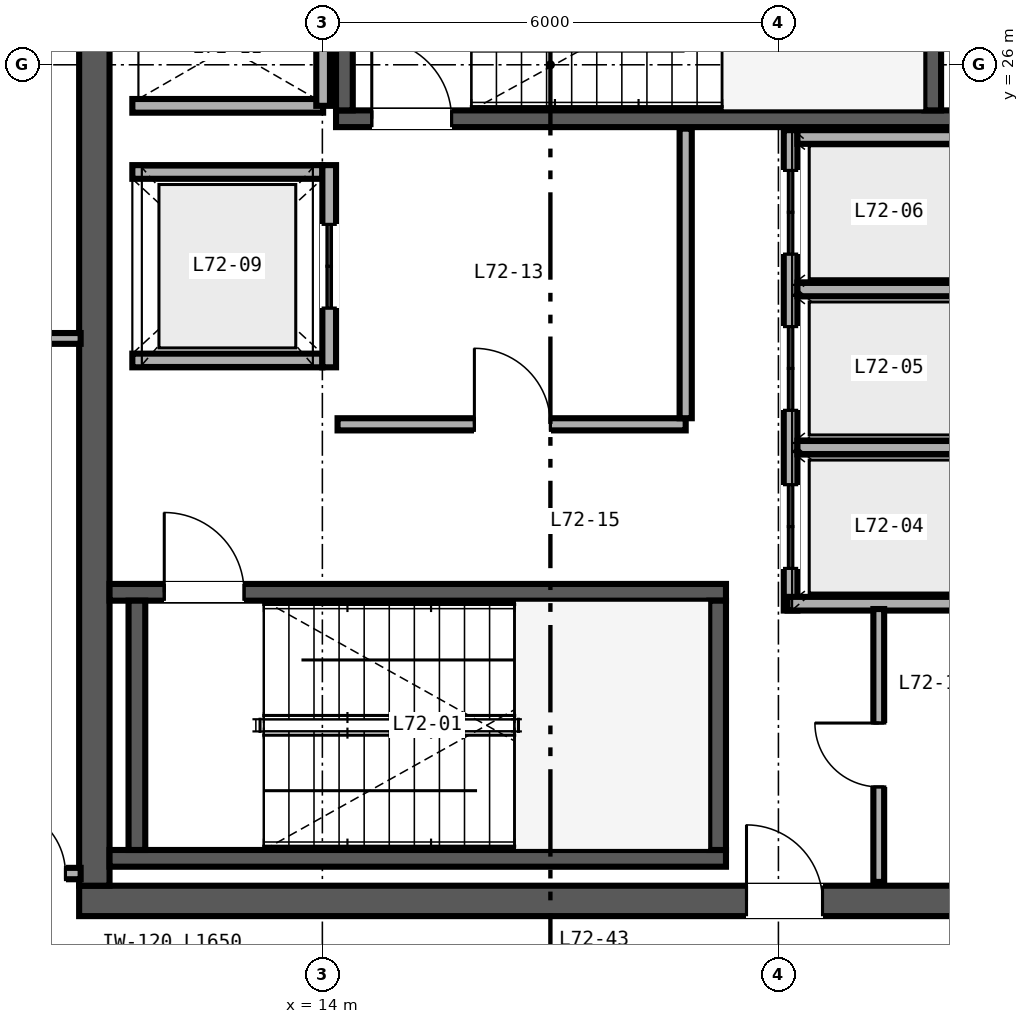
"""IFC4 building model, lengths in metres.
Left out: names, types, materials, properties, quantities, classifications, styles, units other than length and angle.
Written with IfcOpenShell. Run it as: python <this file> out.ifc"""

import sys

from ifc_helpers import new_model, si_unit, direction, frame, frame_2d, origin, place, context, subcontext, project, spatial, rectangle, extrude, source, transform, mapped, element, fill, save


model = new_model("IFC4")
c1 = context("Model", 3, precision=1e-05, world=origin(), true_north=direction((0.0, 1.0)))
c2 = subcontext(c1, "Body", "Model", "MODEL_VIEW")
j1 = project(units=[si_unit("LENGTHUNIT", "METRE"), si_unit("PLANEANGLEUNIT", "RADIAN")], contexts=[c1])
p1 = place(None, origin())
s1 = spatial("IfcSite", under=j1, at=p1, CompositionType="ELEMENT")
p2 = place(p1, origin())
s2 = spatial("IfcBuilding", under=s1, at=p2, CompositionType="ELEMENT")
p3 = place(p2, frame((0.0, 0.0, 283.2)))
s3 = spatial("IfcBuildingStorey", under=s2, at=p3, CompositionType="ELEMENT", Elevation=283.2)
p4 = place(p3, frame((10.8, 15.0, 0.0), z_axis=(0.0, 0.0, 1.0), x_axis=(1.0, 0.0, 0.0)))
e1 = element("IfcWall", 1, at=p4, inside=s3, PredefinedType="SHEAR", context=c2, shape_type="SweptSolid", body=[
    extrude(rectangle(XDim=12.4, YDim=0.4, at=frame_2d((6.2, 0.0))), origin(), (0.0, 0.0, 1.0), 3.38),
])
p5 = place(p4, frame((8.78, 0.0, 0.0)))
e2 = element("IfcOpeningElement", 2, at=p5, cuts=e1, PredefinedType="OPENING", context=c2, shape_type="SweptSolid", body=[
    extrude(rectangle(XDim=1.0, YDim=2.15, at=frame_2d((0.5, 1.075))), frame((0.0, 0.21, 0.0), z_axis=(0.0, -1.0, 0.0), x_axis=(1.0, 0.0, 0.0)), (0.0, 0.0, 1.0), 0.42),
])
p6 = place(p3, frame((11.0, 15.2, 0.0), z_axis=(0.0, 0.0, 1.0), x_axis=(0.0, 1.0, 0.0)))
e3 = element("IfcWall", 3, at=p6, inside=s3, PredefinedType="SHEAR", context=c2, shape_type="SweptSolid", body=[
    extrude(rectangle(XDim=21.6, YDim=0.4, at=frame_2d((10.8, 0.0))), origin(), (0.0, 0.0, 1.0), 3.38),
])
p7 = place(p3, frame((11.2, 15.56, 0.0), z_axis=(0.0, 0.0, 1.0), x_axis=(1.0, 0.0, 0.0)))
e4 = element("IfcWall", 4, at=p7, inside=s3, PredefinedType="SHEAR", context=c2, shape_type="SweptSolid", body=[
    extrude(rectangle(XDim=8.11, YDim=0.22, at=frame_2d((4.055, 0.0))), origin(), (0.0, 0.0, 1.0), 3.4),
])
p8 = place(p3, frame((11.2, 19.06, 0.0), z_axis=(0.0, 0.0, 1.0), x_axis=(1.0, 0.0, 0.0)))
e5 = element("IfcWall", 5, at=p8, inside=s3, PredefinedType="SHEAR", context=c2, shape_type="SweptSolid", body=[
    extrude(rectangle(XDim=8.11, YDim=0.22, at=frame_2d((4.055, 0.0))), origin(), (0.0, 0.0, 1.0), 3.4),
])
p9 = place(p8, frame((0.72, 0.0, 0.0)))
e6 = element("IfcOpeningElement", 6, at=p9, cuts=e5, PredefinedType="OPENING", context=c2, shape_type="SweptSolid", body=[
    extrude(rectangle(XDim=1.05, YDim=2.15, at=frame_2d((0.525, 1.075))), frame((0.0, 0.12, 0.0), z_axis=(0.0, -1.0, 0.0), x_axis=(1.0, 0.0, 0.0)), (0.0, 0.0, 1.0), 0.24),
])
for number, where, z_axis, x_axis in (
    (7, (11.56, 15.67, 0.0), (0.0, 0.0, 1.0), (0.0, 1.0, 0.0)),
    (8, (19.2, 15.67, 0.0), (0.0, 0.0, 1.0), (0.0, 1.0, 0.0)),
):
    element("IfcWall", number, at=place(p3, frame(where, z_axis=z_axis, x_axis=x_axis)), inside=s3, PredefinedType="SHEAR", context=c2, shape_type="SweptSolid", body=[
        extrude(rectangle(XDim=3.28, YDim=0.22, at=frame_2d((1.64, 0.0))), origin(), (0.0, 0.0, 1.0), 3.4),
    ])
p10 = place(p3, frame((14.18, 25.29, 0.0), z_axis=(0.0, 0.0, 1.0), x_axis=(1.0, 0.0, 0.0)))
e9 = element("IfcWall", 9, at=p10, inside=s3, PredefinedType="SHEAR", context=c2, shape_type="SweptSolid", body=[
    extrude(rectangle(XDim=8.62, YDim=0.22, at=frame_2d((4.31, 0.0))), origin(), (0.0, 0.0, 1.0), 3.4),
])
p11 = place(p10, frame((0.47, 0.0, 0.0)))
e10 = element("IfcOpeningElement", 10, at=p11, cuts=e9, PredefinedType="OPENING", context=c2, shape_type="SweptSolid", body=[
    extrude(rectangle(XDim=1.05, YDim=2.15, at=frame_2d((0.525, 1.075))), frame((0.0, 0.12, 0.0), z_axis=(0.0, -1.0, 0.0), x_axis=(1.0, 0.0, 0.0)), (0.0, 0.0, 1.0), 0.24),
])
for number, where, z_axis, x_axis in (
    (11, (14.29, 25.4, 0.0), (0.0, 0.0, 1.0), (0.0, 1.0, 0.0)),
    (12, (22.03, 25.4, 0.0), (0.0, 0.0, 1.0), (0.0, 1.0, 0.0)),
):
    element("IfcWall", number, at=place(p3, frame(where, z_axis=z_axis, x_axis=x_axis)), inside=s3, PredefinedType="SHEAR", context=c2, shape_type="SweptSolid", body=[
        extrude(rectangle(XDim=3.28, YDim=0.22, at=frame_2d((1.64, 0.0))), origin(), (0.0, 0.0, 1.0), 3.4),
    ])
p12 = place(p3, frame((20.16, 18.82, 0.0), z_axis=(0.0, 0.0, 1.0), x_axis=(0.0, 1.0, 0.0)))
e13 = element("IfcWall", 13, at=p12, inside=s3, PredefinedType="SOLIDWALL", context=c2, shape_type="SweptSolid", body=[
    extrude(rectangle(XDim=6.32, YDim=0.18, at=frame_2d((3.16, 0.0))), origin(), (0.0, 0.0, 1.0), 2.48),
])
p13 = place(p12, frame((0.555, 0.0, 0.0)))
e14 = element("IfcOpeningElement", 14, at=p13, cuts=e13, PredefinedType="OPENING", context=c2, shape_type="SweptSolid", body=[
    extrude(rectangle(XDim=1.1, YDim=2.2, at=frame_2d((0.55, 1.1))), frame((0.0, 0.1, 0.0), z_axis=(0.0, -1.0, 0.0), x_axis=(1.0, 0.0, 0.0)), (0.0, 0.0, 1.0), 0.2),
])
p14 = place(p12, frame((2.635, 0.0, 0.0)))
e15 = element("IfcOpeningElement", 15, at=p14, cuts=e13, PredefinedType="OPENING", context=c2, shape_type="SweptSolid", body=[
    extrude(rectangle(XDim=1.1, YDim=2.2, at=frame_2d((0.55, 1.1))), frame((0.0, 0.1, 0.0), z_axis=(0.0, -1.0, 0.0), x_axis=(1.0, 0.0, 0.0)), (0.0, 0.0, 1.0), 0.2),
])
p15 = place(p12, frame((4.69, 0.0, 0.0)))
e16 = element("IfcOpeningElement", 16, at=p15, cuts=e13, PredefinedType="OPENING", context=c2, shape_type="SweptSolid", body=[
    extrude(rectangle(XDim=1.1, YDim=2.2, at=frame_2d((0.55, 1.1))), frame((0.0, 0.1, 0.0), z_axis=(0.0, -1.0, 0.0), x_axis=(1.0, 0.0, 0.0)), (0.0, 0.0, 1.0), 0.2),
])
p16 = place(p3, frame((20.12, 18.91, 0.0), z_axis=(0.0, 0.0, 1.0), x_axis=(1.0, 0.0, 0.0)))
e17 = element("IfcWall", 17, at=p16, inside=s3, PredefinedType="SOLIDWALL", context=c2, shape_type="SweptSolid", body=[
    extrude(rectangle(XDim=2.63, YDim=0.18, at=frame_2d((1.315, 0.0))), origin(), (0.0, 0.0, 1.0), 3.38),
])
p17 = place(p3, frame((20.25, 25.05, 0.0), z_axis=(0.0, 0.0, 1.0), x_axis=(1.0, 0.0, 0.0)))
e18 = element("IfcWall", 18, at=p17, inside=s3, PredefinedType="SOLIDWALL", context=c2, shape_type="SweptSolid", body=[
    extrude(rectangle(XDim=2.36, YDim=0.18, at=frame_2d((1.18, 0.0))), origin(), (0.0, 0.0, 1.0), 3.38),
])
p18 = place(p3, frame((20.25, 20.965, 0.0), z_axis=(0.0, 0.0, 1.0), x_axis=(1.0, 0.0, 0.0)))
e19 = element("IfcWall", 19, at=p18, inside=s3, PredefinedType="SOLIDWALL", context=c2, shape_type="SweptSolid", body=[
    extrude(rectangle(XDim=2.36, YDim=0.18, at=frame_2d((1.18, 0.0))), origin(), (0.0, 0.0, 1.0), 2.48),
])
p19 = place(p3, frame((20.25, 23.045, 0.0), z_axis=(0.0, 0.0, 1.0), x_axis=(1.0, 0.0, 0.0)))
e20 = element("IfcWall", 20, at=p19, inside=s3, PredefinedType="SOLIDWALL", context=c2, shape_type="SweptSolid", body=[
    extrude(rectangle(XDim=2.36, YDim=0.18, at=frame_2d((1.18, 0.0))), origin(), (0.0, 0.0, 1.0), 3.38),
])
for number, where, z_axis, x_axis in (
    (21, (11.5, 22.11, 0.0), (0.0, 0.0, 1.0), (1.0, 0.0, 0.0)),
    (22, (11.5, 24.59, 0.0), (0.0, 0.0, 1.0), (1.0, 0.0, 0.0)),
):
    element("IfcWall", number, at=place(p3, frame(where, z_axis=z_axis, x_axis=x_axis)), inside=s3, PredefinedType="SOLIDWALL", context=c2, shape_type="SweptSolid", body=[
        extrude(rectangle(XDim=2.5, YDim=0.18, at=frame_2d((1.25, 0.0))), origin(), (0.0, 0.0, 1.0), 3.38),
    ])
p20 = place(p3, frame((14.09, 22.02, 0.0), z_axis=(0.0, 0.0, 1.0), x_axis=(0.0, 1.0, 0.0)))
e23 = element("IfcWall", 23, at=p20, inside=s3, PredefinedType="SOLIDWALL", context=c2, shape_type="SweptSolid", body=[
    extrude(rectangle(XDim=2.66, YDim=0.18, at=frame_2d((1.33, 0.0))), origin(), (0.0, 0.0, 1.0), 3.38),
])
p21 = place(p20, frame((0.78, 0.0, 0.0)))
e24 = element("IfcOpeningElement", 24, at=p21, cuts=e23, PredefinedType="OPENING", context=c2, shape_type="SweptSolid", body=[
    extrude(rectangle(XDim=1.1, YDim=2.2, at=frame_2d((0.55, 1.1))), frame((0.0, 0.1, 0.0), z_axis=(0.0, -1.0, 0.0), x_axis=(1.0, 0.0, 0.0)), (0.0, 0.0, 1.0), 0.2),
])
p22 = place(p3, frame((11.5, 25.46, 0.0), z_axis=(0.0, 0.0, 1.0), x_axis=(1.0, 0.0, 0.0)))
e25 = element("IfcWall", 25, at=p22, inside=s3, PredefinedType="SOLIDWALL", context=c2, shape_type="SweptSolid", body=[
    extrude(rectangle(XDim=2.51, YDim=0.18, at=frame_2d((1.255, 0.0))), origin(), (0.0, 0.0, 1.0), 3.38),
])
p23 = place(p3, frame((14.01, 25.46, 0.0), z_axis=(0.0, 0.0, 1.0), x_axis=(0.0, 1.0, 0.0)))
e26 = element("IfcWall", 26, at=p23, inside=s3, PredefinedType="SOLIDWALL", context=c2, shape_type="SweptSolid", body=[
    extrude(rectangle(XDim=3.08, YDim=0.18, at=frame_2d((1.54, 0.0))), origin(), (0.0, 0.0, 1.0), 3.38),
])
p24 = place(p3, frame((14.2, 21.27, 0.0), z_axis=(0.0, 0.0, 1.0), x_axis=(1.0, 0.0, 0.0)))
e27 = element("IfcWall", 27, at=p24, inside=s3, PredefinedType="PARTITIONING", context=c2, shape_type="SweptSolid", body=[
    extrude(rectangle(XDim=4.58, YDim=0.16, at=frame_2d((2.29, 0.0))), origin(), (0.0, 0.0, 1.0), 3.38),
])
p25 = place(p24, frame((1.8, 0.0, 0.0)))
e28 = element("IfcOpeningElement", 28, at=p25, cuts=e27, PredefinedType="OPENING", context=c2, shape_type="SweptSolid", body=[
    extrude(rectangle(XDim=1.0, YDim=2.15, at=frame_2d((0.5, 1.075))), frame((0.0, 0.09, 0.0), z_axis=(0.0, -1.0, 0.0), x_axis=(1.0, 0.0, 0.0)), (0.0, 0.0, 1.0), 0.18),
])
p26 = place(p3, frame((18.78, 21.35, 0.0), z_axis=(0.0, 0.0, 1.0), x_axis=(0.0, 1.0, 0.0)))
e29 = element("IfcWall", 29, at=p26, inside=s3, PredefinedType="PARTITIONING", context=c2, shape_type="SweptSolid", body=[
    extrude(rectangle(XDim=3.81, YDim=0.16, at=frame_2d((1.905, 0.0))), origin(), (0.0, 0.0, 1.0), 3.38),
])
p27 = place(p3, frame((21.32, 15.25, 0.0), z_axis=(0.0, 0.0, 1.0), x_axis=(0.0, 1.0, 0.0)))
e30 = element("IfcWall", 30, at=p27, inside=s3, PredefinedType="PARTITIONING", context=c2, shape_type="SweptSolid", body=[
    extrude(rectangle(XDim=3.59, YDim=0.142, at=frame_2d((1.795, 0.0))), origin(), (0.0, 0.0, 1.0), 3.38),
])
p28 = place(p27, frame((1.25, 0.0, 0.0)))
e31 = element("IfcOpeningElement", 31, at=p28, cuts=e30, PredefinedType="OPENING", context=c2, shape_type="SweptSolid", body=[
    extrude(rectangle(XDim=0.84, YDim=2.1, at=frame_2d((0.42, 1.05))), frame((0.0, 0.081, 0.0), z_axis=(0.0, -1.0, 0.0), x_axis=(1.0, 0.0, 0.0)), (0.0, 0.0, 1.0), 0.162),
])
p29 = place(p3, frame((8.16, 15.36, 0.0), z_axis=(0.0, 0.0, 1.0), x_axis=(1.0, 0.0, 0.0)))
e32 = element("IfcWall", 32, at=p29, inside=s3, PredefinedType="PARTITIONING", context=c2, shape_type="SweptSolid", body=[
    extrude(rectangle(XDim=2.66, YDim=0.15, at=frame_2d((1.33, 0.0))), origin(), (0.0, 0.0, 1.0), 2.601),
])
p30 = place(p29, frame((1.58, 0.0, 0.0)))
e33 = element("IfcOpeningElement", 33, at=p30, cuts=e32, PredefinedType="OPENING", context=c2, shape_type="SweptSolid", body=[
    extrude(rectangle(XDim=0.88, YDim=2.15, at=frame_2d((0.44, 1.075))), frame((0.0, 0.085, 0.0), z_axis=(0.0, -1.0, 0.0), x_axis=(1.0, 0.0, 0.0)), (0.0, 0.0, 1.0), 0.17),
])
p31 = place(p3, frame((8.16, 22.4, 0.0), z_axis=(0.0, 0.0, 1.0), x_axis=(1.0, 0.0, 0.0)))
e34 = element("IfcWall", 34, at=p31, inside=s3, PredefinedType="PARTITIONING", context=c2, shape_type="SweptSolid", body=[
    extrude(rectangle(XDim=2.66, YDim=0.142, at=frame_2d((1.33, 0.0))), origin(), (0.0, 0.0, 1.0), 2.601),
])
m1 = source(origin(), c2, "Body", "SweptSolid", [
    extrude(rectangle(XDim=1.05, YDim=2.15, at=frame_2d((0.525, 1.075))), frame((0.0, 0.025, 0.0), z_axis=(0.0, -1.0, 0.0), x_axis=(1.0, 0.0, 0.0)), (0.0, 0.0, 1.0), 0.05),
])
p32 = place(p9, origin())
e35 = element("IfcDoor", 35, at=p32, inside=s3, OperationType="SINGLE_SWING_LEFT", PredefinedType="DOOR", context=c2, shape_type="MappedRepresentation", body=[
    mapped(m1, transform((0.0, 0.0, 0.0), scale=1.0)),
])
fill(e6, e35)
p33 = place(p11, origin())
e36 = element("IfcDoor", 36, at=p33, inside=s3, OperationType="SINGLE_SWING_LEFT", PredefinedType="DOOR", context=c2, shape_type="MappedRepresentation", body=[
    mapped(m1, transform((0.0, 0.0, 0.0), scale=1.0)),
])
fill(e10, e36)
m2 = source(origin(), c2, "Body", "SweptSolid", [
    extrude(rectangle(XDim=1.1, YDim=2.2, at=frame_2d((0.55, 1.1))), frame((0.0, 0.025, 0.0), z_axis=(0.0, -1.0, 0.0), x_axis=(1.0, 0.0, 0.0)), (0.0, 0.0, 1.0), 0.05),
])
p34 = place(p13, origin())
e37 = element("IfcDoor", 37, at=p34, inside=s3, OperationType="DOUBLE_DOOR_SLIDING", PredefinedType="DOOR", context=c2, shape_type="MappedRepresentation", body=[
    mapped(m2, transform((0.0, 0.0, 0.0), scale=1.0)),
])
fill(e14, e37)
p35 = place(p14, origin())
e38 = element("IfcDoor", 38, at=p35, inside=s3, OperationType="DOUBLE_DOOR_SLIDING", PredefinedType="DOOR", context=c2, shape_type="MappedRepresentation", body=[
    mapped(m2, transform((0.0, 0.0, 0.0), scale=1.0)),
])
fill(e15, e38)
p36 = place(p15, origin())
e39 = element("IfcDoor", 39, at=p36, inside=s3, OperationType="DOUBLE_DOOR_SLIDING", PredefinedType="DOOR", context=c2, shape_type="MappedRepresentation", body=[
    mapped(m2, transform((0.0, 0.0, 0.0), scale=1.0)),
])
fill(e16, e39)
p37 = place(p21, origin())
e40 = element("IfcDoor", 40, at=p37, inside=s3, OperationType="DOUBLE_DOOR_SLIDING", PredefinedType="DOOR", context=c2, shape_type="MappedRepresentation", body=[
    mapped(m2, transform((0.0, 0.0, 0.0), scale=1.0)),
])
fill(e24, e40)
m3 = source(origin(), c2, "Body", "SweptSolid", [
    extrude(rectangle(XDim=1.0, YDim=2.15, at=frame_2d((0.5, 1.075))), frame((0.0, 0.025, 0.0), z_axis=(0.0, -1.0, 0.0), x_axis=(1.0, 0.0, 0.0)), (0.0, 0.0, 1.0), 0.05),
])
p38 = place(p25, origin())
e41 = element("IfcDoor", 41, at=p38, inside=s3, OperationType="SINGLE_SWING_LEFT", PredefinedType="DOOR", context=c2, shape_type="MappedRepresentation", body=[
    mapped(m3, transform((0.0, 0.0, 0.0), scale=1.0)),
])
fill(e28, e41)
m4 = source(origin(), c2, "Body", "SweptSolid", [
    extrude(rectangle(XDim=0.84, YDim=2.1, at=frame_2d((0.42, 1.05))), frame((0.0, 0.025, 0.0), z_axis=(0.0, -1.0, 0.0), x_axis=(1.0, 0.0, 0.0)), (0.0, 0.0, 1.0), 0.05),
])
p39 = place(p28, origin())
e42 = element("IfcDoor", 42, at=p39, inside=s3, OperationType="SINGLE_SWING_RIGHT", PredefinedType="DOOR", context=c2, shape_type="MappedRepresentation", body=[
    mapped(m4, transform((0.0, 0.0, 0.0), scale=1.0)),
])
fill(e31, e42)
p40 = place(p5, origin())
e43 = element("IfcDoor", 43, at=p40, inside=s3, OperationType="SINGLE_SWING_LEFT", PredefinedType="DOOR", context=c2, shape_type="MappedRepresentation", body=[
    mapped(m3, transform((0.0, 0.0, 0.0), scale=1.0)),
])
fill(e2, e43)
m5 = source(origin(), c2, "Body", "SweptSolid", [
    extrude(rectangle(XDim=0.88, YDim=2.15, at=frame_2d((0.44, 1.075))), frame((0.0, 0.025, 0.0), z_axis=(0.0, -1.0, 0.0), x_axis=(1.0, 0.0, 0.0)), (0.0, 0.0, 1.0), 0.05),
])
p41 = place(p30, origin())
e44 = element("IfcDoor", 44, at=p41, inside=s3, OperationType="SINGLE_SWING_LEFT", PredefinedType="DOOR", context=c2, shape_type="MappedRepresentation", body=[
    mapped(m5, transform((0.0, 0.0, 0.0), scale=1.0)),
])
fill(e33, e44)
save(model, sys.argv[1])
